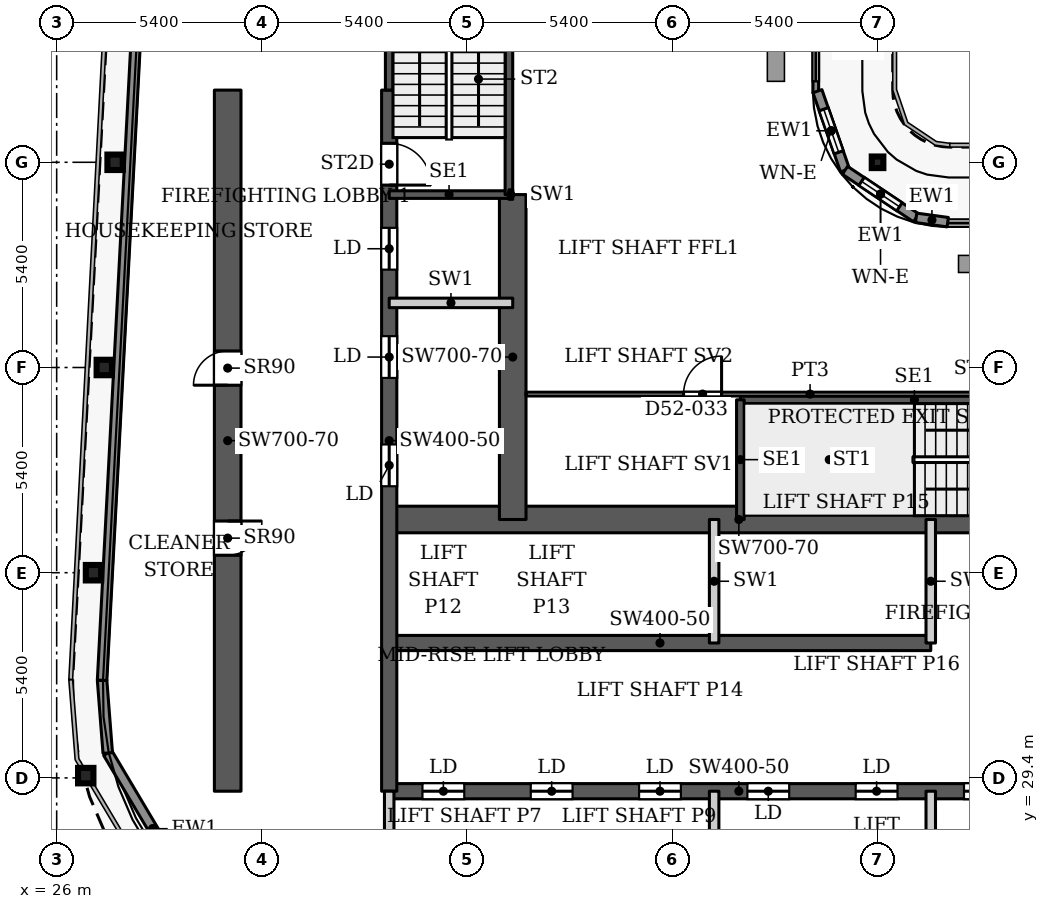
"""IFC4 building model, lengths in metres.
Left out: names, types, materials, properties, quantities, classifications, styles, units other than length and angle.
Written with IfcOpenShell. Run it as: python <this file> out.ifc"""

import sys

from ifc_helpers import new_model, si_unit, direction, frame, frame_2d, origin, origin_2d, place, context, subcontext, project, spatial, rectangle, hollow_rectangle, i_section, extrude, source, transform, mapped, element, fill, save


model = new_model("IFC4")
c1 = context("Model", 3, precision=1e-05, world=origin(), true_north=direction((0.0, 1.0)))
c2 = subcontext(c1, "Body", "Model", "MODEL_VIEW")
j1 = project(units=[si_unit("LENGTHUNIT", "METRE"), si_unit("PLANEANGLEUNIT", "RADIAN")], contexts=[c1])
p1 = place(None, origin())
s1 = spatial("IfcSite", under=j1, at=p1, CompositionType="ELEMENT")
p2 = place(p1, origin())
s2 = spatial("IfcBuilding", under=s1, at=p2, CompositionType="ELEMENT")
p3 = place(p2, frame((0.0, 0.0, 224.0)))
s3 = spatial("IfcBuildingStorey", under=s2, at=p3, CompositionType="ELEMENT", Elevation=224.0)
for number, where, z_axis, x_axis in (
    (1, (26.765, 29.46, 0.0), (0.0, 0.0, 1.0), (1.0, 0.0, 0.0)),
    (2, (26.969, 34.8, 0.0), (0.0, 0.0, 1.0), (1.0, 0.0, 0.0)),
    (3, (27.253, 40.2, 0.0), (0.0, 0.0, 1.0), (1.0, 0.0, 0.0)),
    (4, (27.537, 45.6, 0.0), (0.0, 0.0, 1.0), (1.0, 0.0, 0.0)),
):
    element("IfcColumn", number, at=place(p3, frame(where, z_axis=z_axis, x_axis=x_axis)), inside=s3, PredefinedType="COLUMN", context=c2, shape_type="SweptSolid", body=[
        extrude(i_section(OverallWidth=0.404, OverallDepth=0.407, WebThickness=0.027, FlangeThickness=0.044, FilletRadius=0.012, at=origin_2d()), origin(), (0.0, 0.0, 1.0), 3.9),
    ])
p4 = place(p3, frame((47.6, 45.6, 0.0), z_axis=(0.0, 0.0, 1.0), x_axis=(1.0, 0.0, 0.0)))
e5 = element("IfcColumn", 5, at=p4, inside=s3, PredefinedType="COLUMN", context=c2, shape_type="SweptSolid", body=[
    extrude(hollow_rectangle(XDim=0.305, YDim=0.305, WallThickness=0.016, InnerFilletRadius=0.016, OuterFilletRadius=0.032, at=origin_2d()), origin(), (0.0, 0.0, 1.0), 3.9),
])
p5 = place(p3, frame((34.75, 29.05, 0.0), z_axis=(0.0, 0.0, 1.0), x_axis=(1.0, 0.0, 0.0)))
e6 = element("IfcWall", 6, at=p5, inside=s3, PredefinedType="SHEAR", context=c2, shape_type="SweptSolid", body=[
    extrude(rectangle(XDim=18.4, YDim=0.4, at=frame_2d((9.2, 0.0))), origin(), (0.0, 0.0, 1.0), 3.9),
])
p6 = place(p5, frame((0.875, 0.0, 0.0)))
e7 = element("IfcOpeningElement", 7, at=p6, cuts=e6, PredefinedType="OPENING", context=c2, shape_type="SweptSolid", body=[
    extrude(rectangle(XDim=1.1, YDim=2.2, at=frame_2d((0.55, 1.1))), frame((0.0, 0.21, 0.0), z_axis=(0.0, -1.0, 0.0), x_axis=(1.0, 0.0, 0.0)), (0.0, 0.0, 1.0), 0.42),
])
p7 = place(p5, frame((3.725, 0.0, 0.0)))
e8 = element("IfcOpeningElement", 8, at=p7, cuts=e6, PredefinedType="OPENING", context=c2, shape_type="SweptSolid", body=[
    extrude(rectangle(XDim=1.1, YDim=2.2, at=frame_2d((0.55, 1.1))), frame((0.0, 0.21, 0.0), z_axis=(0.0, -1.0, 0.0), x_axis=(1.0, 0.0, 0.0)), (0.0, 0.0, 1.0), 0.42),
])
p8 = place(p5, frame((6.575, 0.0, 0.0)))
e9 = element("IfcOpeningElement", 9, at=p8, cuts=e6, PredefinedType="OPENING", context=c2, shape_type="SweptSolid", body=[
    extrude(rectangle(XDim=1.1, YDim=2.2, at=frame_2d((0.55, 1.1))), frame((0.0, 0.21, 0.0), z_axis=(0.0, -1.0, 0.0), x_axis=(1.0, 0.0, 0.0)), (0.0, 0.0, 1.0), 0.42),
])
p9 = place(p5, frame((9.425, 0.0, 0.0)))
e10 = element("IfcOpeningElement", 10, at=p9, cuts=e6, PredefinedType="OPENING", context=c2, shape_type="SweptSolid", body=[
    extrude(rectangle(XDim=1.1, YDim=2.2, at=frame_2d((0.55, 1.1))), frame((0.0, 0.21, 0.0), z_axis=(0.0, -1.0, 0.0), x_axis=(1.0, 0.0, 0.0)), (0.0, 0.0, 1.0), 0.42),
])
p10 = place(p5, frame((12.275, 0.0, 0.0)))
e11 = element("IfcOpeningElement", 11, at=p10, cuts=e6, PredefinedType="OPENING", context=c2, shape_type="SweptSolid", body=[
    extrude(rectangle(XDim=1.1, YDim=2.2, at=frame_2d((0.55, 1.1))), frame((0.0, 0.21, 0.0), z_axis=(0.0, -1.0, 0.0), x_axis=(1.0, 0.0, 0.0)), (0.0, 0.0, 1.0), 0.42),
])
p11 = place(p5, frame((15.125, 0.0, 0.0)))
e12 = element("IfcOpeningElement", 12, at=p11, cuts=e6, PredefinedType="OPENING", context=c2, shape_type="SweptSolid", body=[
    extrude(rectangle(XDim=1.1, YDim=2.2, at=frame_2d((0.55, 1.1))), frame((0.0, 0.21, 0.0), z_axis=(0.0, -1.0, 0.0), x_axis=(1.0, 0.0, 0.0)), (0.0, 0.0, 1.0), 0.42),
])
p12 = place(p3, frame((34.75, 32.95, 0.0), z_axis=(0.0, 0.0, 1.0), x_axis=(1.0, 0.0, 0.0)))
e13 = element("IfcWall", 13, at=p12, inside=s3, PredefinedType="SHEAR", context=c2, shape_type="SweptSolid", body=[
    extrude(rectangle(XDim=14.25, YDim=0.4, at=frame_2d((7.125, 0.0))), origin(), (0.0, 0.0, 1.0), 3.9),
])
p13 = place(p3, frame((34.75, 36.2, 0.0), z_axis=(0.0, 0.0, 1.0), x_axis=(1.0, 0.0, 0.0)))
e14 = element("IfcWall", 14, at=p13, inside=s3, PredefinedType="SHEAR", context=c2, shape_type="SweptSolid", body=[
    extrude(rectangle(XDim=18.4, YDim=0.7, at=frame_2d((9.2, 0.0))), origin(), (0.0, 0.0, 1.0), 3.9),
])
p14 = place(p13, frame((16.9, 0.0, 0.0)))
e15 = element("IfcOpeningElement", 15, at=p14, cuts=e14, PredefinedType="OPENING", context=c2, shape_type="SweptSolid", body=[
    extrude(rectangle(XDim=1.0, YDim=2.2, at=frame_2d((0.5, 1.1))), frame((0.0, 0.36, 0.0), z_axis=(0.0, -1.0, 0.0), x_axis=(1.0, 0.0, 0.0)), (0.0, 0.0, 1.0), 0.72),
])
p15 = place(p3, frame((34.75, 29.05, 0.0), z_axis=(0.0, 0.0, 1.0), x_axis=(0.0, 1.0, 0.0)))
e16 = element("IfcWall", 16, at=p15, inside=s3, PredefinedType="SHEAR", context=c2, shape_type="SweptSolid", body=[
    extrude(rectangle(XDim=18.45, YDim=0.4, at=frame_2d((9.225, 0.0))), origin(), (0.0, 0.0, 1.0), 3.9),
])
p16 = place(p15, frame((8.025, 0.0, 0.0)))
e17 = element("IfcOpeningElement", 17, at=p16, cuts=e16, PredefinedType="OPENING", context=c2, shape_type="SweptSolid", body=[
    extrude(rectangle(XDim=1.1, YDim=2.2, at=frame_2d((0.55, 1.1))), frame((0.0, 0.21, 0.0), z_axis=(0.0, -1.0, 0.0), x_axis=(1.0, 0.0, 0.0)), (0.0, 0.0, 1.0), 0.42),
])
p17 = place(p15, frame((10.875, 0.0, 0.0)))
e18 = element("IfcOpeningElement", 18, at=p17, cuts=e16, PredefinedType="OPENING", context=c2, shape_type="SweptSolid", body=[
    extrude(rectangle(XDim=1.1, YDim=2.2, at=frame_2d((0.55, 1.1))), frame((0.0, 0.21, 0.0), z_axis=(0.0, -1.0, 0.0), x_axis=(1.0, 0.0, 0.0)), (0.0, 0.0, 1.0), 0.42),
])
p18 = place(p15, frame((13.725, 0.0, 0.0)))
e19 = element("IfcOpeningElement", 19, at=p18, cuts=e16, PredefinedType="OPENING", context=c2, shape_type="SweptSolid", body=[
    extrude(rectangle(XDim=1.1, YDim=2.2, at=frame_2d((0.55, 1.1))), frame((0.0, 0.21, 0.0), z_axis=(0.0, -1.0, 0.0), x_axis=(1.0, 0.0, 0.0)), (0.0, 0.0, 1.0), 0.42),
])
p19 = place(p15, frame((15.95, 0.0, 0.0)))
e20 = element("IfcOpeningElement", 20, at=p19, cuts=e16, PredefinedType="OPENING", context=c2, shape_type="SweptSolid", body=[
    extrude(rectangle(XDim=1.1, YDim=2.2, at=frame_2d((0.55, 1.1))), frame((0.0, 0.21, 0.0), z_axis=(0.0, -1.0, 0.0), x_axis=(1.0, 0.0, 0.0)), (0.0, 0.0, 1.0), 0.42),
])
p20 = place(p3, frame((38.0, 36.2, 0.0), z_axis=(0.0, 0.0, 1.0), x_axis=(0.0, 1.0, 0.0)))
e21 = element("IfcWall", 21, at=p20, inside=s3, PredefinedType="SHEAR", context=c2, shape_type="SweptSolid", body=[
    extrude(rectangle(XDim=8.55, YDim=0.7, at=frame_2d((4.275, 0.0))), origin(), (0.0, 0.0, 1.0), 3.9),
])
p21 = place(p3, frame((30.5, 29.05, 0.0), z_axis=(0.0, 0.0, 1.0), x_axis=(0.0, 1.0, 0.0)))
e22 = element("IfcWall", 22, at=p21, inside=s3, PredefinedType="SHEAR", context=c2, shape_type="SweptSolid", body=[
    extrude(rectangle(XDim=18.45, YDim=0.7, at=frame_2d((9.225, 0.0))), origin(), (0.0, 0.0, 1.0), 3.9),
])
p22 = place(p21, frame((6.21, 0.0, 0.0)))
e23 = element("IfcOpeningElement", 23, at=p22, cuts=e22, PredefinedType="OPENING", context=c2, shape_type="SweptSolid", body=[
    extrude(rectangle(XDim=0.9, YDim=2.2, at=frame_2d((0.45, 1.1))), frame((0.0, 0.36, 0.0), z_axis=(0.0, -1.0, 0.0), x_axis=(1.0, 0.0, 0.0)), (0.0, 0.0, 1.0), 0.72),
])
p23 = place(p21, frame((10.684, 0.0, 0.0)))
e24 = element("IfcOpeningElement", 24, at=p23, cuts=e22, PredefinedType="OPENING", context=c2, shape_type="SweptSolid", body=[
    extrude(rectangle(XDim=0.9, YDim=2.2, at=frame_2d((0.45, 1.1))), frame((0.0, 0.36, 0.0), z_axis=(0.0, -1.0, 0.0), x_axis=(1.0, 0.0, 0.0)), (0.0, 0.0, 1.0), 0.72),
])
p24 = place(p3, frame((45.975, 49.83, 0.0), z_axis=(0.0, 0.0, 1.0), x_axis=(0.0, -1.0, 0.0)))
e25 = element("IfcWall", 25, at=p24, inside=s3, PredefinedType="SOLIDWALL", context=c2, shape_type="SweptSolid", body=[
    extrude(rectangle(XDim=2.4, YDim=0.15, at=frame_2d((1.2, 0.0))), origin(), (0.0, 0.0, 1.0), 3.75),
])
p25 = place(p24, frame((0.3, 0.0, 0.0)))
e26 = element("IfcOpeningElement", 26, at=p25, cuts=e25, PredefinedType="OPENING", context=c2, shape_type="SweptSolid", body=[
    extrude(rectangle(XDim=1.8, YDim=2.4, at=frame_2d((0.9, 1.2))), frame((0.0, 0.085, 0.0), z_axis=(0.0, -1.0, 0.0), x_axis=(1.0, 0.0, 0.0)), (0.0, 0.0, 1.0), 0.17),
])
p26 = place(p3, frame((46.018, 47.471, 0.0), z_axis=(0.0, 0.0, 1.0), x_axis=(0.328791208903, -0.944402637093, 0.0)))
e27 = element("IfcWall", 27, at=p26, inside=s3, PredefinedType="SOLIDWALL", context=c2, shape_type="SweptSolid", body=[
    extrude(rectangle(XDim=2.205, YDim=0.25, at=frame_2d((1.102, 0.0))), origin(), (0.0, 0.0, 1.0), 3.75),
])
p27 = place(p26, frame((0.503, 0.0, 0.6)))
e28 = element("IfcOpeningElement", 28, at=p27, cuts=e27, PredefinedType="OPENING", context=c2, shape_type="SweptSolid", body=[
    extrude(rectangle(XDim=1.2, YDim=2.1, at=frame_2d((0.6, 1.05))), frame((0.0, 0.135, 0.0), z_axis=(0.0, -1.0, 0.0), x_axis=(1.0, 0.0, 0.0)), (0.0, 0.0, 1.0), 0.27),
])
p28 = place(p3, frame((46.743, 45.389, 0.0), z_axis=(0.0, 0.0, 1.0), x_axis=(0.831449265529, -0.555600682912, 0.0)))
e29 = element("IfcWall", 29, at=p28, inside=s3, PredefinedType="SOLIDWALL", context=c2, shape_type="SweptSolid", body=[
    extrude(rectangle(XDim=2.251, YDim=0.25, at=frame_2d((1.126, 0.0))), origin(), (0.0, 0.0, 1.0), 3.75),
])
p29 = place(p28, frame((0.525, 0.0, 0.6)))
e30 = element("IfcOpeningElement", 30, at=p29, cuts=e29, PredefinedType="OPENING", context=c2, shape_type="SweptSolid", body=[
    extrude(rectangle(XDim=1.2, YDim=2.1, at=frame_2d((0.6, 1.05))), frame((0.0, 0.135, 0.0), z_axis=(0.0, -1.0, 0.0), x_axis=(1.0, 0.0, 0.0)), (0.0, 0.0, 1.0), 0.27),
])
p30 = place(p3, frame((48.615, 44.138, 0.0), z_axis=(0.0, 0.0, 1.0), x_axis=(0.990741504246, -0.135761819977, 0.0)))
e31 = element("IfcWall", 31, at=p30, inside=s3, PredefinedType="SOLIDWALL", context=c2, shape_type="SweptSolid", body=[
    extrude(rectangle(XDim=0.84, YDim=0.25, at=frame_2d((0.42, 0.0))), origin(), (0.0, 0.0, 1.0), 3.75),
])
p31 = place(p3, frame((29.712, 26.072, 0.0), z_axis=(0.0, 0.0, 1.0), x_axis=(-0.511028049012, 0.859564036662, 0.0)))
e32 = element("IfcWall", 32, at=p31, inside=s3, PredefinedType="SOLIDWALL", context=c2, shape_type="SweptSolid", body=[
    extrude(rectangle(XDim=4.634, YDim=0.25, at=frame_2d((2.317, 0.0))), origin(), (0.0, 0.0, 1.0), 3.217),
])
p32 = place(p3, frame((27.344, 30.055, 0.0), z_axis=(0.0, 0.0, 1.0), x_axis=(-0.077571675317, 0.99698677784, 0.0)))
e33 = element("IfcWall", 33, at=p32, inside=s3, PredefinedType="SOLIDWALL", context=c2, shape_type="SweptSolid", body=[
    extrude(rectangle(XDim=1.92, YDim=0.25, at=frame_2d((0.96, 0.0))), origin(), (0.0, 0.0, 1.0), 3.75),
])
p33 = place(p3, frame((27.195, 31.969, 0.0), z_axis=(0.0, 0.0, 1.0), x_axis=(0.052559748861, 0.998617781135, 0.0)))
e34 = element("IfcWall", 34, at=p33, inside=s3, PredefinedType="SOLIDWALL", context=c2, shape_type="SweptSolid", body=[
    extrude(rectangle(XDim=55.972, YDim=0.25, at=frame_2d((27.986, 0.0))), origin(), (0.0, 0.0, 1.0), 3.75),
])
p34 = place(p3, frame((43.99, 39.35, 0.0), z_axis=(0.0, 0.0, 1.0), x_axis=(1.0, 0.0, 0.0)))
e35 = element("IfcWall", 35, at=p34, inside=s3, PredefinedType="SHEAR", context=c2, shape_type="SweptSolid", body=[
    extrude(rectangle(XDim=9.16, YDim=0.2, at=frame_2d((4.58, 0.0))), origin(), (0.0, 0.0, 1.0), 3.9),
])
p35 = place(p3, frame((43.99, 36.2, 0.0), z_axis=(0.0, 0.0, 1.0), x_axis=(0.0, 1.0, 0.0)))
e36 = element("IfcWall", 36, at=p35, inside=s3, PredefinedType="SHEAR", context=c2, shape_type="SweptSolid", body=[
    extrude(rectangle(XDim=3.15, YDim=0.2, at=frame_2d((1.575, 0.0))), origin(), (0.0, 0.0, 1.0), 3.9),
])
p36 = place(p3, frame((34.75, 44.75, 0.0), z_axis=(0.0, 0.0, 1.0), x_axis=(1.0, 0.0, 0.0)))
e37 = element("IfcWall", 37, at=p36, inside=s3, PredefinedType="SHEAR", context=c2, shape_type="SweptSolid", body=[
    extrude(rectangle(XDim=3.15, YDim=0.2, at=frame_2d((1.575, 0.0))), origin(), (0.0, 0.0, 1.0), 3.9),
])
p37 = place(p3, frame((34.75, 47.5, 0.0), z_axis=(0.0, 0.0, 1.0), x_axis=(0.0, 1.0, 0.0)))
e38 = element("IfcWall", 38, at=p37, inside=s3, PredefinedType="SHEAR", context=c2, shape_type="SweptSolid", body=[
    extrude(rectangle(XDim=6.41, YDim=0.2, at=frame_2d((3.205, 0.0))), origin(), (0.0, 0.0, 1.0), 3.9),
])
p38 = place(p3, frame((37.9, 44.75, 0.0), z_axis=(0.0, 0.0, 1.0), x_axis=(0.0, 1.0, 0.0)))
e39 = element("IfcWall", 39, at=p38, inside=s3, PredefinedType="SHEAR", context=c2, shape_type="SweptSolid", body=[
    extrude(rectangle(XDim=9.16, YDim=0.2, at=frame_2d((4.58, 0.0))), origin(), (0.0, 0.0, 1.0), 3.9),
])
for number, where, z_axis, x_axis in (
    (40, (34.75, 25.8, 0.0), (0.0, 0.0, 1.0), (0.0, 1.0, 0.0)),
    (41, (43.3, 25.8, 0.0), (0.0, 0.0, 1.0), (0.0, 1.0, 0.0)),
    (42, (43.3, 32.95, 0.0), (0.0, 0.0, 1.0), (0.0, 1.0, 0.0)),
    (43, (49.0, 25.8, 0.0), (0.0, 0.0, 1.0), (0.0, 1.0, 0.0)),
    (44, (49.0, 32.95, 0.0), (0.0, 0.0, 1.0), (0.0, 1.0, 0.0)),
    (45, (34.75, 41.9, 0.0), (0.0, 0.0, 1.0), (1.0, 0.0, 0.0)),
):
    element("IfcWall", number, at=place(p3, frame(where, z_axis=z_axis, x_axis=x_axis)), inside=s3, PredefinedType="PARTITIONING", context=c2, shape_type="SweptSolid", body=[
        extrude(rectangle(XDim=3.25, YDim=0.25, at=frame_2d((1.625, 0.0))), origin(), (0.0, 0.0, 1.0), 3.9),
    ])
p39 = place(p3, frame((37.9, 44.75, 0.0), z_axis=(0.0, 0.0, 1.0), x_axis=(1.0, 0.0, 0.0)))
e46 = element("IfcWall", 46, at=p39, inside=s3, PredefinedType="PARTITIONING", context=c2, shape_type="SweptSolid", body=[
    extrude(rectangle(XDim=0.1, YDim=0.25, at=frame_2d((0.05, 0.0))), origin(), (0.0, 0.0, 1.0), 3.9),
])
p40 = place(p3, frame((38.349, 39.5, 0.0), z_axis=(0.0, 0.0, 1.0), x_axis=(1.0, 0.0, 0.0)))
e47 = element("IfcWall", 47, at=p40, inside=s3, PredefinedType="PARTITIONING", context=c2, shape_type="SweptSolid", body=[
    extrude(rectangle(XDim=14.951, YDim=0.1, at=frame_2d((7.476, 0.0))), origin(), (0.0, 0.0, 1.0), 3.6),
])
p41 = place(p40, frame((4.147, 0.0, 0.0)))
e48 = element("IfcOpeningElement", 48, at=p41, cuts=e47, PredefinedType="OPENING", context=c2, shape_type="SweptSolid", body=[
    extrude(rectangle(XDim=1.0, YDim=2.1, at=frame_2d((0.5, 1.05))), frame((0.0, 0.06, 0.0), z_axis=(0.0, -1.0, 0.0), x_axis=(1.0, 0.0, 0.0)), (0.0, 0.0, 1.0), 0.12),
])
m1 = source(origin(), c2, "Body", "SweptSolid", [
    extrude(rectangle(XDim=1.8, YDim=2.4, at=frame_2d((0.9, 1.2))), frame((0.0, 0.025, 0.0), z_axis=(0.0, -1.0, 0.0), x_axis=(1.0, 0.0, 0.0)), (0.0, 0.0, 1.0), 0.05),
])
p42 = place(p25, origin())
e49 = element("IfcDoor", 49, at=p42, inside=s3, OperationType="SLIDING_TO_LEFT", PredefinedType="DOOR", context=c2, shape_type="MappedRepresentation", body=[
    mapped(m1, transform((0.0, 0.0, 0.0), x_axis=(1.0, 0.0, 0.0), y_axis=(0.0, 1.0, 0.0), z_axis=(0.0, 0.0, 1.0), scale=1.0)),
])
fill(e26, e49)
m2 = source(origin(), c2, "Body", "SweptSolid", [
    extrude(rectangle(XDim=1.2, YDim=2.1, at=frame_2d((0.6, 1.05))), frame((0.0, 0.03, 0.0), z_axis=(0.0, -1.0, 0.0), x_axis=(1.0, 0.0, 0.0)), (0.0, 0.0, 1.0), 0.06),
])
p43 = place(p27, origin())
e50 = element("IfcWindow", 50, at=p43, inside=s3, PartitioningType="SINGLE_PANEL", PredefinedType="WINDOW", context=c2, shape_type="MappedRepresentation", body=[
    mapped(m2, transform((0.0, 0.0, 0.0), x_axis=(1.0, 0.0, 0.0), y_axis=(0.0, 1.0, 0.0), z_axis=(0.0, 0.0, 1.0), scale=1.0)),
])
fill(e28, e50)
p44 = place(p29, origin())
e51 = element("IfcWindow", 51, at=p44, inside=s3, PartitioningType="SINGLE_PANEL", PredefinedType="WINDOW", context=c2, shape_type="MappedRepresentation", body=[
    mapped(m2, transform((0.0, 0.0, 0.0), x_axis=(1.0, 0.0, 0.0), y_axis=(0.0, 1.0, 0.0), z_axis=(0.0, 0.0, 1.0), scale=1.0)),
])
fill(e30, e51)
m3 = source(origin(), c2, "Body", "SweptSolid", [
    extrude(rectangle(XDim=1.1, YDim=2.2, at=frame_2d((0.55, 1.1))), frame((0.0, 0.025, 0.0), z_axis=(0.0, -1.0, 0.0), x_axis=(1.0, 0.0, 0.0)), (0.0, 0.0, 1.0), 0.05),
])
p45 = place(p6, origin())
e52 = element("IfcDoor", 52, at=p45, inside=s3, OperationType="SLIDING_TO_LEFT", PredefinedType="DOOR", context=c2, shape_type="MappedRepresentation", body=[
    mapped(m3, transform((0.0, 0.0, 0.0), x_axis=(1.0, 0.0, 0.0), y_axis=(0.0, 1.0, 0.0), z_axis=(0.0, 0.0, 1.0), scale=1.0)),
])
fill(e7, e52)
p46 = place(p7, origin())
e53 = element("IfcDoor", 53, at=p46, inside=s3, OperationType="SLIDING_TO_LEFT", PredefinedType="DOOR", context=c2, shape_type="MappedRepresentation", body=[
    mapped(m3, transform((0.0, 0.0, 0.0), x_axis=(1.0, 0.0, 0.0), y_axis=(0.0, 1.0, 0.0), z_axis=(0.0, 0.0, 1.0), scale=1.0)),
])
fill(e8, e53)
p47 = place(p8, origin())
e54 = element("IfcDoor", 54, at=p47, inside=s3, OperationType="SLIDING_TO_LEFT", PredefinedType="DOOR", context=c2, shape_type="MappedRepresentation", body=[
    mapped(m3, transform((0.0, 0.0, 0.0), x_axis=(1.0, 0.0, 0.0), y_axis=(0.0, 1.0, 0.0), z_axis=(0.0, 0.0, 1.0), scale=1.0)),
])
fill(e9, e54)
p48 = place(p9, origin())
e55 = element("IfcDoor", 55, at=p48, inside=s3, OperationType="SLIDING_TO_LEFT", PredefinedType="DOOR", context=c2, shape_type="MappedRepresentation", body=[
    mapped(m3, transform((0.0, 0.0, 0.0), x_axis=(1.0, 0.0, 0.0), y_axis=(0.0, 1.0, 0.0), z_axis=(0.0, 0.0, 1.0), scale=1.0)),
])
fill(e10, e55)
p49 = place(p10, origin())
e56 = element("IfcDoor", 56, at=p49, inside=s3, OperationType="SLIDING_TO_LEFT", PredefinedType="DOOR", context=c2, shape_type="MappedRepresentation", body=[
    mapped(m3, transform((0.0, 0.0, 0.0), x_axis=(1.0, 0.0, 0.0), y_axis=(0.0, 1.0, 0.0), z_axis=(0.0, 0.0, 1.0), scale=1.0)),
])
fill(e11, e56)
p50 = place(p16, origin())
e57 = element("IfcDoor", 57, at=p50, inside=s3, OperationType="SLIDING_TO_LEFT", PredefinedType="DOOR", context=c2, shape_type="MappedRepresentation", body=[
    mapped(m3, transform((0.0, 0.0, 0.0), x_axis=(1.0, 0.0, 0.0), y_axis=(0.0, 1.0, 0.0), z_axis=(0.0, 0.0, 1.0), scale=1.0)),
])
fill(e17, e57)
p51 = place(p17, origin())
e58 = element("IfcDoor", 58, at=p51, inside=s3, OperationType="SLIDING_TO_LEFT", PredefinedType="DOOR", context=c2, shape_type="MappedRepresentation", body=[
    mapped(m3, transform((0.0, 0.0, 0.0), x_axis=(1.0, 0.0, 0.0), y_axis=(0.0, 1.0, 0.0), z_axis=(0.0, 0.0, 1.0), scale=1.0)),
])
fill(e18, e58)
p52 = place(p18, origin())
e59 = element("IfcDoor", 59, at=p52, inside=s3, OperationType="SLIDING_TO_LEFT", PredefinedType="DOOR", context=c2, shape_type="MappedRepresentation", body=[
    mapped(m3, transform((0.0, 0.0, 0.0), x_axis=(1.0, 0.0, 0.0), y_axis=(0.0, 1.0, 0.0), z_axis=(0.0, 0.0, 1.0), scale=1.0)),
])
fill(e19, e59)
p53 = place(p11, origin())
e60 = element("IfcDoor", 60, at=p53, inside=s3, OperationType="SLIDING_TO_LEFT", PredefinedType="DOOR", context=c2, shape_type="MappedRepresentation", body=[
    mapped(m3, transform((0.0, 0.0, 0.0), x_axis=(1.0, 0.0, 0.0), y_axis=(0.0, 1.0, 0.0), z_axis=(0.0, 0.0, 1.0), scale=1.0)),
])
fill(e12, e60)
m4 = source(origin(), c2, "Body", "SweptSolid", [
    extrude(rectangle(XDim=0.9, YDim=2.2, at=frame_2d((0.45, 1.1))), frame((0.0, 0.025, 0.0), z_axis=(0.0, -1.0, 0.0), x_axis=(1.0, 0.0, 0.0)), (0.0, 0.0, 1.0), 0.05),
])
p54 = place(p22, origin())
e61 = element("IfcDoor", 61, at=p54, inside=s3, OperationType="SINGLE_SWING_RIGHT", PredefinedType="DOOR", context=c2, shape_type="MappedRepresentation", body=[
    mapped(m4, transform((0.0, 0.0, 0.0), x_axis=(1.0, 0.0, 0.0), y_axis=(0.0, 1.0, 0.0), z_axis=(0.0, 0.0, 1.0), scale=1.0)),
])
fill(e23, e61)
p55 = place(p23, origin())
e62 = element("IfcDoor", 62, at=p55, inside=s3, OperationType="SINGLE_SWING_LEFT", PredefinedType="DOOR", context=c2, shape_type="MappedRepresentation", body=[
    mapped(m4, transform((0.0, 0.0, 0.0), x_axis=(1.0, 0.0, 0.0), y_axis=(0.0, 1.0, 0.0), z_axis=(0.0, 0.0, 1.0), scale=1.0)),
])
fill(e24, e62)
m5 = source(origin(), c2, "Body", "SweptSolid", [
    extrude(rectangle(XDim=1.1, YDim=2.2, at=frame_2d((0.55, 1.1))), frame((0.0, 0.025, 0.0), z_axis=(0.0, -1.0, 0.0), x_axis=(1.0, 0.0, 0.0)), (0.0, 0.0, 1.0), 0.05),
])
p56 = place(p19, origin())
e63 = element("IfcDoor", 63, at=p56, inside=s3, OperationType="SINGLE_SWING_RIGHT", PredefinedType="DOOR", context=c2, shape_type="MappedRepresentation", body=[
    mapped(m5, transform((0.0, 0.0, 0.0), x_axis=(1.0, 0.0, 0.0), y_axis=(0.0, 1.0, 0.0), z_axis=(0.0, 0.0, 1.0), scale=1.0)),
])
fill(e20, e63)
m6 = source(origin(), c2, "Body", "SweptSolid", [
    extrude(rectangle(XDim=1.0, YDim=2.1, at=frame_2d((0.5, 1.05))), frame((0.0, 0.025, 0.0), z_axis=(0.0, -1.0, 0.0), x_axis=(1.0, 0.0, 0.0)), (0.0, 0.0, 1.0), 0.05),
])
p57 = place(p41, origin())
e64 = element("IfcDoor", 64, at=p57, inside=s3, OperationType="SINGLE_SWING_LEFT", PredefinedType="DOOR", context=c2, shape_type="MappedRepresentation", body=[
    mapped(m6, transform((0.0, 0.0, 0.0), x_axis=(1.0, 0.0, 0.0), y_axis=(0.0, 1.0, 0.0), z_axis=(0.0, 0.0, 1.0), scale=1.0)),
])
fill(e48, e64)
save(model, sys.argv[1])
